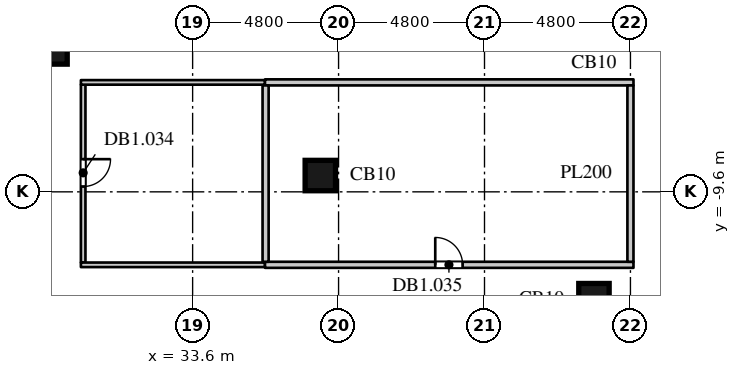
"""IFC4 building model, lengths in metres.
Left out: names, types, materials, properties, quantities, classifications, styles, units other than length and angle.
Written with IfcOpenShell. Run it as: python <this file> out.ifc"""

import sys

from ifc_helpers import new_model, si_unit, direction, frame, frame_2d, origin, origin_2d, place, context, subcontext, project, spatial, rectangle, extrude, element, fill, save


model = new_model("IFC4")
c1 = context("Model", 3, precision=1e-05, world=origin(), true_north=direction((0.0, 1.0)))
c2 = subcontext(c1, "Body", "Model", "MODEL_VIEW")
j1 = project(units=[si_unit("LENGTHUNIT", "METRE"), si_unit("PLANEANGLEUNIT", "RADIAN")], contexts=[c1])
p1 = place(None, origin())
s1 = spatial("IfcSite", under=j1, at=p1, CompositionType="ELEMENT")
p2 = place(p1, origin())
s2 = spatial("IfcBuilding", under=s1, at=p2, CompositionType="ELEMENT")
p3 = place(p2, frame((0.0, 0.0, -4.5)))
s3 = spatial("IfcBuildingStorey", under=s2, at=p3, CompositionType="ELEMENT", Elevation=-4.5)
for number, where, z_axis, x_axis in (
    (1, (46.8, -13.114, 0.0), (0.0, 0.0, 1.0), (1.0, 0.0, 0.0)),
    (2, (37.8, -9.064, 0.0), (0.0, 0.0, 1.0), (1.0, 0.0, 0.0)),
):
    element("IfcColumn", number, at=place(p3, frame(where, z_axis=z_axis, x_axis=x_axis)), inside=s3, PredefinedType="COLUMN", context=c2, shape_type="SweptSolid", body=[
        extrude(rectangle(XDim=1.0, YDim=1.0, at=origin_2d()), origin(), (0.0, 0.0, 1.0), 4.5),
    ])
p4 = place(p3, frame((28.575, -4.8, 0.0), z_axis=(0.0, 0.0, 1.0), x_axis=(0.0, 1.0, 0.0)))
e3 = element("IfcColumn", 3, at=p4, inside=s3, PredefinedType="COLUMN", context=c2, shape_type="SweptSolid", body=[
    extrude(rectangle(XDim=1.2, YDim=1.8, at=origin_2d()), origin(), (0.0, 0.0, 1.0), 4.5),
])
p5 = place(p3, frame((30.0, -11.925, 0.0), z_axis=(0.0, 0.0, 1.0), x_axis=(0.0, 1.0, 0.0)))
e4 = element("IfcWall", 4, at=p5, inside=s3, PredefinedType="PARTITIONING", context=c2, shape_type="SweptSolid", body=[
    extrude(rectangle(XDim=5.85, YDim=0.15, at=frame_2d((2.925, 0.0))), origin(), (0.0, 0.0, 1.0), 4.048),
])
p6 = place(p5, frame((2.5, 0.0, 0.0)))
e5 = element("IfcOpeningElement", 5, at=p6, cuts=e4, PredefinedType="OPENING", context=c2, shape_type="SweptSolid", body=[
    extrude(rectangle(XDim=0.9, YDim=2.2, at=frame_2d((0.45, 1.1))), frame((0.0, 0.085, 0.0), z_axis=(0.0, -1.0, 0.0), x_axis=(1.0, 0.0, 0.0)), (0.0, 0.0, 1.0), 0.17),
])
for number, where, z_axis, x_axis in (
    (6, (29.925, -12.0, 0.0), (0.0, 0.0, 1.0), (1.0, 0.0, 0.0)),
    (7, (29.925, -6.0, 0.0), (0.0, 0.0, 1.0), (1.0, 0.0, 0.0)),
):
    element("IfcWall", number, at=place(p3, frame(where, z_axis=z_axis, x_axis=x_axis)), inside=s3, PredefinedType="PARTITIONING", context=c2, shape_type="SweptSolid", body=[
        extrude(rectangle(XDim=6.055, YDim=0.15, at=frame_2d((3.027, 0.0))), origin(), (0.0, 0.0, 1.0), 4.048),
    ])
p7 = place(p3, frame((35.98, -12.0, 0.0), z_axis=(0.0, 0.0, 1.0), x_axis=(1.0, 0.0, 0.0)))
e8 = element("IfcWall", 8, at=p7, inside=s3, PredefinedType="PARTITIONING", context=c2, shape_type="SweptSolid", body=[
    extrude(rectangle(XDim=12.12, YDim=0.2, at=frame_2d((6.06, 0.0))), origin(), (0.0, 0.0, 1.0), 4.048),
])
p8 = place(p7, frame((5.6, 0.0, 0.0)))
e9 = element("IfcOpeningElement", 9, at=p8, cuts=e8, PredefinedType="OPENING", context=c2, shape_type="SweptSolid", body=[
    extrude(rectangle(XDim=0.9, YDim=2.2, at=frame_2d((0.45, 1.1))), frame((0.0, 0.11, 0.0), z_axis=(0.0, -1.0, 0.0), x_axis=(1.0, 0.0, 0.0)), (0.0, 0.0, 1.0), 0.22),
])
p9 = place(p3, frame((35.98, -6.0, 0.0), z_axis=(0.0, 0.0, 1.0), x_axis=(1.0, 0.0, 0.0)))
e10 = element("IfcWall", 10, at=p9, inside=s3, PredefinedType="PARTITIONING", context=c2, shape_type="SweptSolid", body=[
    extrude(rectangle(XDim=12.12, YDim=0.2, at=frame_2d((6.06, 0.0))), origin(), (0.0, 0.0, 1.0), 4.048),
])
for number, where, z_axis, x_axis in (
    (11, (36.0, -11.9, 0.0), (0.0, 0.0, 1.0), (0.0, 1.0, 0.0)),
    (12, (48.0, -11.9, 0.0), (0.0, 0.0, 1.0), (0.0, 1.0, 0.0)),
):
    element("IfcWall", number, at=place(p3, frame(where, z_axis=z_axis, x_axis=x_axis)), inside=s3, PredefinedType="PARTITIONING", context=c2, shape_type="SweptSolid", body=[
        extrude(rectangle(XDim=5.8, YDim=0.2, at=frame_2d((2.9, 0.0))), origin(), (0.0, 0.0, 1.0), 4.048),
    ])
p10 = place(p6, origin())
e13 = element("IfcDoor", 13, at=p10, inside=s3, OperationType="SINGLE_SWING_LEFT", PredefinedType="DOOR", context=c2, shape_type="SweptSolid", body=[
    extrude(rectangle(XDim=0.9, YDim=2.2, at=frame_2d((0.45, 1.1))), frame((0.0, 0.025, 0.0), z_axis=(0.0, -1.0, 0.0), x_axis=(1.0, 0.0, 0.0)), (0.0, 0.0, 1.0), 0.05),
])
fill(e5, e13)
p11 = place(p8, origin())
e14 = element("IfcDoor", 14, at=p11, inside=s3, OperationType="SINGLE_SWING_LEFT", PredefinedType="DOOR", context=c2, shape_type="SweptSolid", body=[
    extrude(rectangle(XDim=0.9, YDim=2.2, at=frame_2d((0.45, 1.1))), frame((0.0, 0.025, 0.0), z_axis=(0.0, -1.0, 0.0), x_axis=(1.0, 0.0, 0.0)), (0.0, 0.0, 1.0), 0.05),
])
fill(e9, e14)
save(model, sys.argv[1])
